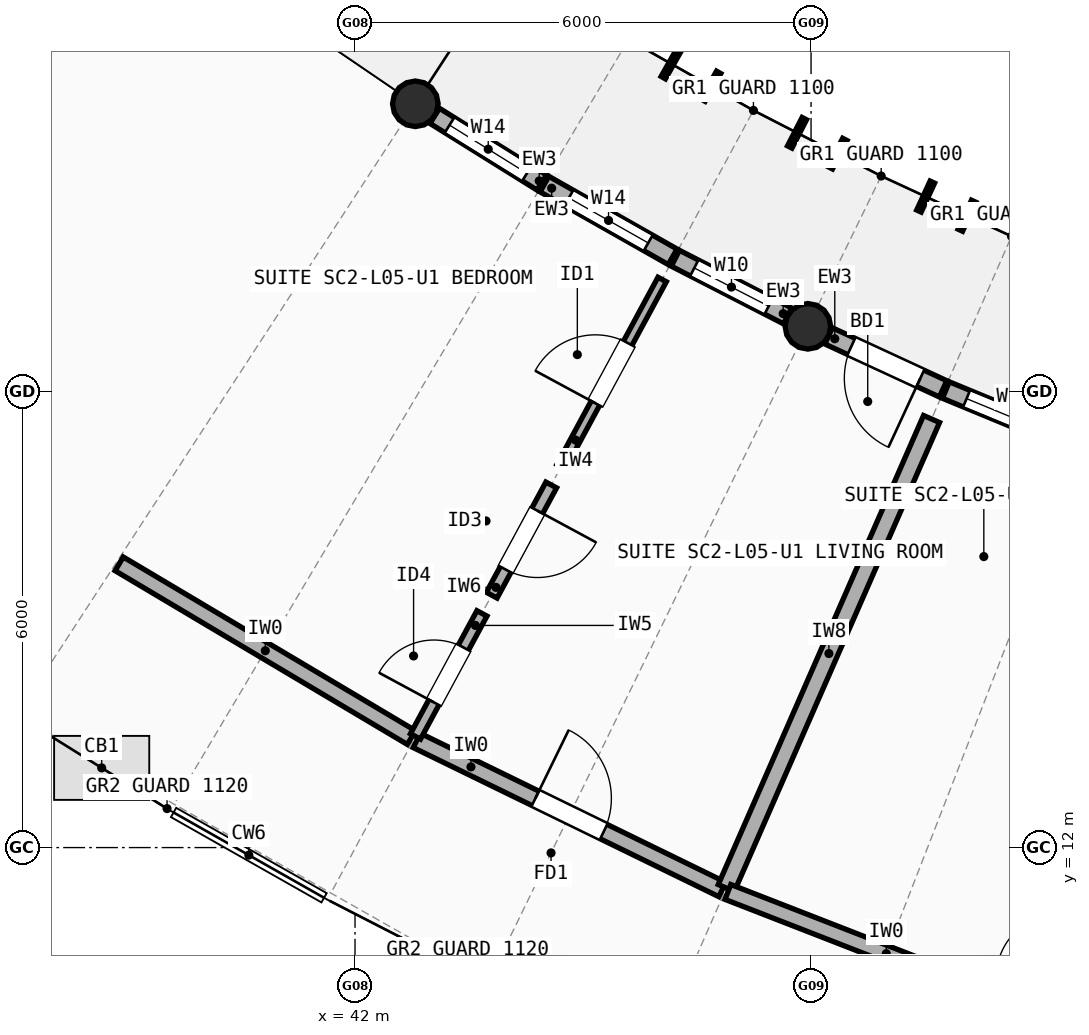
"""IFC4 building model, lengths in metres.
Left out: names, types, materials, properties, quantities, classifications, styles, units other than length and angle.
Written with IfcOpenShell. Run it as: python <this file> out.ifc"""

import sys

from ifc_helpers import new_model, si_unit, direction, frame, frame_2d, origin, origin_2d, place, context, subcontext, project, spatial, rectangle, circle, extrude, element, fill, save


model = new_model("IFC4")
c1 = context("Model", 3, precision=1e-05, world=origin(), true_north=direction((0.0, 1.0)))
c2 = subcontext(c1, "Body", "Model", "MODEL_VIEW")
j1 = project(units=[si_unit("LENGTHUNIT", "METRE"), si_unit("PLANEANGLEUNIT", "RADIAN")], contexts=[c1])
p1 = place(None, origin())
s1 = spatial("IfcSite", under=j1, at=p1, CompositionType="ELEMENT")
p2 = place(p1, origin())
s2 = spatial("IfcBuilding", under=s1, at=p2, CompositionType="ELEMENT")
p3 = place(p2, frame((0.0, 0.0, 17.3)))
s3 = spatial("IfcBuildingStorey", under=s2, at=p3, CompositionType="ELEMENT", Elevation=17.3)
for number, where, z_axis, x_axis in (
    (1, (42.793, 21.785, 0.0), (0.0, 0.0, 1.0), (1.0, 0.0, 0.0)),
    (2, (47.958, 18.858, 0.0), (0.0, 0.0, 1.0), (1.0, 0.0, 0.0)),
):
    element("IfcColumn", number, at=place(p3, frame(where, z_axis=z_axis, x_axis=x_axis)), inside=s3, PredefinedType="COLUMN", context=c2, shape_type="SweptSolid", body=[
        extrude(circle(Radius=0.3, at=origin_2d()), origin(), (0.0, 0.0, 1.0), 2.94),
    ])
p4 = place(p3, frame((43.048, 21.627, 0.0), z_axis=(0.0, 0.0, 1.0), x_axis=(0.848955427013, -0.528464457598, 0.0)))
e3 = element("IfcWall", 3, at=p4, inside=s3, PredefinedType="STANDARD", context=c2, shape_type="SweptSolid", body=[
    extrude(rectangle(XDim=1.66, YDim=0.235, at=frame_2d((0.83, 0.0))), origin(), (0.0, 0.0, 1.0), 2.676),
])
p5 = place(p4, frame((0.23, 0.0, 0.85)))
e4 = element("IfcOpeningElement", 4, at=p5, cuts=e3, PredefinedType="OPENING", context=c2, shape_type="SweptSolid", body=[
    extrude(rectangle(XDim=1.2, YDim=1.5, at=frame_2d((0.6, 0.75))), frame((0.0, 0.127, 0.0), z_axis=(0.0, -1.0, 0.0), x_axis=(1.0, 0.0, 0.0)), (0.0, 0.0, 1.0), 0.255),
])
p6 = place(p3, frame((44.492, 20.729, 0.0), z_axis=(0.0, 0.0, 1.0), x_axis=(0.86993400964, -0.493168144623, 0.0)))
e5 = element("IfcWall", 5, at=p6, inside=s3, PredefinedType="STANDARD", context=c2, shape_type="SweptSolid", body=[
    extrude(rectangle(XDim=1.94, YDim=0.235, at=frame_2d((0.97, 0.0))), origin(), (0.0, 0.0, 1.0), 2.676),
])
p7 = place(p6, frame((0.37, 0.0, 0.85)))
e6 = element("IfcOpeningElement", 6, at=p7, cuts=e5, PredefinedType="OPENING", context=c2, shape_type="SweptSolid", body=[
    extrude(rectangle(XDim=1.2, YDim=1.5, at=frame_2d((0.6, 0.75))), frame((0.0, 0.127, 0.0), z_axis=(0.0, -1.0, 0.0), x_axis=(1.0, 0.0, 0.0)), (0.0, 0.0, 1.0), 0.255),
])
p8 = place(p3, frame((46.215, 19.753, 0.0), z_axis=(0.0, 0.0, 1.0), x_axis=(0.889521792954, -0.456892744372, 0.0)))
e7 = element("IfcWall", 7, at=p8, inside=s3, PredefinedType="STANDARD", context=c2, shape_type="SweptSolid", body=[
    extrude(rectangle(XDim=1.66, YDim=0.235, at=frame_2d((0.83, 0.0))), origin(), (0.0, 0.0, 1.0), 2.676),
])
p9 = place(p8, frame((0.28, 0.0, 0.85)))
e8 = element("IfcOpeningElement", 8, at=p9, cuts=e7, PredefinedType="OPENING", context=c2, shape_type="SweptSolid", body=[
    extrude(rectangle(XDim=1.1, YDim=1.45, at=frame_2d((0.55, 0.725))), frame((0.0, 0.127, 0.0), z_axis=(0.0, -1.0, 0.0), x_axis=(1.0, 0.0, 0.0)), (0.0, 0.0, 1.0), 0.255),
])
p10 = place(p3, frame((48.23, 18.732, 0.0), z_axis=(0.0, 0.0, 1.0), x_axis=(0.907631944022, -0.419766904592, 0.0)))
e9 = element("IfcWall", 9, at=p10, inside=s3, PredefinedType="STANDARD", context=c2, shape_type="SweptSolid", body=[
    extrude(rectangle(XDim=1.66, YDim=0.235, at=frame_2d((0.83, 0.0))), origin(), (0.0, 0.0, 1.0), 2.676),
])
p11 = place(p10, frame((0.33, 0.0, 0.0)))
e10 = element("IfcOpeningElement", 10, at=p11, cuts=e9, PredefinedType="OPENING", context=c2, shape_type="SweptSolid", body=[
    extrude(rectangle(XDim=1.0, YDim=2.15, at=frame_2d((0.5, 1.075))), frame((0.0, 0.127, 0.0), z_axis=(0.0, -1.0, 0.0), x_axis=(1.0, 0.0, 0.0)), (0.0, 0.0, 1.0), 0.255),
])
p12 = place(p3, frame((49.774, 18.019, 0.0), z_axis=(0.0, 0.0, 1.0), x_axis=(0.92414555515, -0.382040564465, 0.0)))
e11 = element("IfcWall", 11, at=p12, inside=s3, PredefinedType="STANDARD", context=c2, shape_type="SweptSolid", body=[
    extrude(rectangle(XDim=1.94, YDim=0.235, at=frame_2d((0.97, 0.0))), origin(), (0.0, 0.0, 1.0), 2.676),
])
p13 = place(p12, frame((0.295, 0.0, 0.85)))
e12 = element("IfcOpeningElement", 12, at=p13, cuts=e11, PredefinedType="OPENING", context=c2, shape_type="SweptSolid", body=[
    extrude(rectangle(XDim=1.35, YDim=1.5, at=frame_2d((0.675, 0.75))), frame((0.0, 0.127, 0.0), z_axis=(0.0, -1.0, 0.0), x_axis=(1.0, 0.0, 0.0)), (0.0, 0.0, 1.0), 0.255),
])
p14 = place(p3, frame((38.897, 15.733, 0.0), z_axis=(0.0, 0.0, 1.0), x_axis=(0.859614290038, -0.510943511909, 0.0)))
e13 = element("IfcWall", 13, at=p14, inside=s3, PredefinedType="SOLIDWALL", context=c2, shape_type="SweptSolid", body=[
    extrude(rectangle(XDim=4.473, YDim=0.21, at=frame_2d((2.236, 0.0))), origin(), (0.0, 0.0, 1.0), 2.754),
])
p15 = place(p3, frame((42.812, 13.409, 0.0), z_axis=(0.0, 0.0, 1.0), x_axis=(0.898794149603, -0.438370934985, 0.0)))
e14 = element("IfcWall", 14, at=p15, inside=s3, PredefinedType="SOLIDWALL", context=c2, shape_type="SweptSolid", body=[
    extrude(rectangle(XDim=4.473, YDim=0.21, at=frame_2d((2.236, 0.0))), origin(), (0.0, 0.0, 1.0), 2.734),
])
p16 = place(p15, frame((1.737, 0.0, 0.0)))
e15 = element("IfcOpeningElement", 15, at=p16, cuts=e14, PredefinedType="OPENING", context=c2, shape_type="SweptSolid", body=[
    extrude(rectangle(XDim=1.0, YDim=2.15, at=frame_2d((0.5, 1.075))), frame((0.0, 0.115, 0.0), z_axis=(0.0, -1.0, 0.0), x_axis=(1.0, 0.0, 0.0)), (0.0, 0.0, 1.0), 0.23),
])
p17 = place(p3, frame((46.041, 19.474, 0.0), z_axis=(0.0, 0.0, 1.0), x_axis=(-0.475103009949, -0.879930184695, 0.0)))
e16 = element("IfcWall", 16, at=p17, inside=s3, PredefinedType="PARTITIONING", context=c2, shape_type="SweptSolid", body=[
    extrude(rectangle(XDim=2.8, YDim=0.125, at=frame_2d((1.4, 0.0))), origin(), (0.0, 0.0, 1.0), 2.714),
])
p18 = place(p17, frame((0.95, 0.0, 0.0)))
e17 = element("IfcOpeningElement", 17, at=p18, cuts=e16, PredefinedType="OPENING", context=c2, shape_type="SweptSolid", body=[
    extrude(rectangle(XDim=0.9, YDim=2.1, at=frame_2d((0.45, 1.05))), frame((0.0, 0.073, 0.0), z_axis=(0.0, -1.0, 0.0), x_axis=(1.0, 0.0, 0.0)), (0.0, 0.0, 1.0), 0.145),
])
p19 = place(p3, frame((44.582, 16.771, 0.0), z_axis=(0.0, 0.0, 1.0), x_axis=(-0.475080097018, -0.879942555749, 0.0)))
e18 = element("IfcWall", 18, at=p19, inside=s3, PredefinedType="PLUMBINGWALL", context=c2, shape_type="SweptSolid", body=[
    extrude(rectangle(XDim=1.648, YDim=0.16, at=frame_2d((0.824, 0.0))), origin(), (0.0, 0.0, 1.0), 2.714),
])
p20 = place(p19, frame((0.384, 0.0, 0.0)))
e19 = element("IfcOpeningElement", 19, at=p20, cuts=e18, PredefinedType="OPENING", context=c2, shape_type="SweptSolid", body=[
    extrude(rectangle(XDim=0.88, YDim=2.1, at=frame_2d((0.44, 1.05))), frame((0.0, 0.09, 0.0), z_axis=(0.0, -1.0, 0.0), x_axis=(1.0, 0.0, 0.0)), (0.0, 0.0, 1.0), 0.18),
])
p21 = place(p3, frame((43.669, 15.081, 0.0), z_axis=(0.0, 0.0, 1.0), x_axis=(-0.475017414672, -0.879976395001, 0.0)))
e20 = element("IfcWall", 20, at=p21, inside=s3, PredefinedType="PARTITIONING", context=c2, shape_type="SweptSolid", body=[
    extrude(rectangle(XDim=1.84, YDim=0.15, at=frame_2d((0.92, 0.0))), origin(), (0.0, 0.0, 1.0), 2.714),
])
p22 = place(p21, frame((0.51, 0.0, 0.0)))
e21 = element("IfcOpeningElement", 21, at=p22, cuts=e20, PredefinedType="OPENING", context=c2, shape_type="SweptSolid", body=[
    extrude(rectangle(XDim=0.82, YDim=2.08, at=frame_2d((0.41, 1.04))), frame((0.0, 0.085, 0.0), z_axis=(0.0, -1.0, 0.0), x_axis=(1.0, 0.0, 0.0)), (0.0, 0.0, 1.0), 0.17),
])
p23 = place(p3, frame((49.585, 17.638, 0.0), z_axis=(0.0, 0.0, 1.0), x_axis=(-0.400932910895, -0.916107417807, 0.0)))
e22 = element("IfcWall", 22, at=p23, inside=s3, PredefinedType="SOLIDWALL", context=c2, shape_type="SweptSolid", body=[
    extrude(rectangle(XDim=6.736, YDim=0.23, at=frame_2d((3.368, 0.0))), origin(), (0.0, 0.0, 1.0), 2.754),
])
p24 = place(p3, frame((46.906, 11.417, 0.0), z_axis=(0.0, 0.0, 1.0), x_axis=(0.931847867525, -0.362849213571, 0.0)))
e23 = element("IfcWall", 23, at=p24, inside=s3, PredefinedType="SOLIDWALL", context=c2, shape_type="SweptSolid", body=[
    extrude(rectangle(XDim=4.473, YDim=0.21, at=frame_2d((2.237, 0.0))), origin(), (0.0, 0.0, 1.0), 2.714),
])
p25 = place(p5, origin())
e24 = element("IfcWindow", 24, at=p25, inside=s3, PartitioningType="SINGLE_PANEL", PredefinedType="WINDOW", context=c2, shape_type="SweptSolid", body=[
    extrude(rectangle(XDim=1.2, YDim=1.5, at=frame_2d((0.6, 0.75))), frame((0.0, 0.03, 0.0), z_axis=(0.0, -1.0, 0.0), x_axis=(1.0, 0.0, 0.0)), (0.0, 0.0, 1.0), 0.06),
])
fill(e4, e24)
p26 = place(p7, origin())
e25 = element("IfcWindow", 25, at=p26, inside=s3, PartitioningType="SINGLE_PANEL", PredefinedType="WINDOW", context=c2, shape_type="SweptSolid", body=[
    extrude(rectangle(XDim=1.2, YDim=1.5, at=frame_2d((0.6, 0.75))), frame((0.0, 0.03, 0.0), z_axis=(0.0, -1.0, 0.0), x_axis=(1.0, 0.0, 0.0)), (0.0, 0.0, 1.0), 0.06),
])
fill(e6, e25)
p27 = place(p9, origin())
e26 = element("IfcWindow", 26, at=p27, inside=s3, PartitioningType="SINGLE_PANEL", PredefinedType="WINDOW", context=c2, shape_type="SweptSolid", body=[
    extrude(rectangle(XDim=1.1, YDim=1.45, at=frame_2d((0.55, 0.725))), frame((0.0, 0.03, 0.0), z_axis=(0.0, -1.0, 0.0), x_axis=(1.0, 0.0, 0.0)), (0.0, 0.0, 1.0), 0.06),
])
fill(e8, e26)
p28 = place(p11, origin())
e27 = element("IfcDoor", 27, at=p28, inside=s3, OperationType="SINGLE_SWING_RIGHT", PredefinedType="DOOR", context=c2, shape_type="SweptSolid", body=[
    extrude(rectangle(XDim=1.0, YDim=2.15, at=frame_2d((0.5, 1.075))), frame((0.0, 0.025, 0.0), z_axis=(0.0, -1.0, 0.0), x_axis=(1.0, 0.0, 0.0)), (0.0, 0.0, 1.0), 0.05),
])
fill(e10, e27)
p29 = place(p13, origin())
e28 = element("IfcWindow", 28, at=p29, inside=s3, PartitioningType="SINGLE_PANEL", PredefinedType="WINDOW", context=c2, shape_type="SweptSolid", body=[
    extrude(rectangle(XDim=1.35, YDim=1.5, at=frame_2d((0.675, 0.75))), frame((0.0, 0.03, 0.0), z_axis=(0.0, -1.0, 0.0), x_axis=(1.0, 0.0, 0.0)), (0.0, 0.0, 1.0), 0.06),
])
fill(e12, e28)
p30 = place(p16, origin())
e29 = element("IfcDoor", 29, at=p30, inside=s3, OperationType="SINGLE_SWING_LEFT", PredefinedType="DOOR", context=c2, shape_type="SweptSolid", body=[
    extrude(rectangle(XDim=1.0, YDim=2.15, at=frame_2d((0.5, 1.075))), frame((0.0, 0.025, 0.0), z_axis=(0.0, -1.0, 0.0), x_axis=(1.0, 0.0, 0.0)), (0.0, 0.0, 1.0), 0.05),
])
fill(e15, e29)
p31 = place(p18, origin())
e30 = element("IfcDoor", 30, at=p31, inside=s3, OperationType="SINGLE_SWING_RIGHT", PredefinedType="DOOR", context=c2, shape_type="SweptSolid", body=[
    extrude(rectangle(XDim=0.9, YDim=2.1, at=frame_2d((0.45, 1.05))), frame((0.0, 0.025, 0.0), z_axis=(0.0, -1.0, 0.0), x_axis=(1.0, 0.0, 0.0)), (0.0, 0.0, 1.0), 0.05),
])
fill(e17, e30)
p32 = place(p20, origin())
e31 = element("IfcDoor", 31, at=p32, inside=s3, OperationType="SINGLE_SWING_LEFT", PredefinedType="DOOR", context=c2, shape_type="SweptSolid", body=[
    extrude(rectangle(XDim=0.88, YDim=2.1, at=frame_2d((0.44, 1.05))), frame((0.0, 0.025, 0.0), z_axis=(0.0, -1.0, 0.0), x_axis=(1.0, 0.0, 0.0)), (0.0, 0.0, 1.0), 0.05),
])
fill(e19, e31)
p33 = place(p22, origin())
e32 = element("IfcDoor", 32, at=p33, inside=s3, OperationType="SINGLE_SWING_RIGHT", PredefinedType="DOOR", context=c2, shape_type="SweptSolid", body=[
    extrude(rectangle(XDim=0.82, YDim=2.08, at=frame_2d((0.41, 1.04))), frame((0.0, 0.025, 0.0), z_axis=(0.0, -1.0, 0.0), x_axis=(1.0, 0.0, 0.0)), (0.0, 0.0, 1.0), 0.05),
])
fill(e21, e32)
save(model, sys.argv[1])
